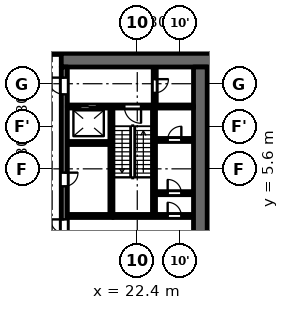
"""IFC4 building model, lengths in metres.
Left out: names, types, materials, properties, quantities, classifications, styles, units other than length and angle.
Written with IfcOpenShell. Run it as: python <this file> out.ifc"""

import sys

from ifc_helpers import new_model, si_unit, direction, frame, frame_2d, origin, origin_2d, place, context, subcontext, project, spatial, polyline, rectangle, outline, extrude, element, fill, save


model = new_model("IFC4")
c1 = context("Model", 3, precision=1e-05, world=origin(), true_north=direction((0.0, 1.0)))
c2 = subcontext(c1, "Body", "Model", "MODEL_VIEW")
j1 = project(units=[si_unit("LENGTHUNIT", "METRE"), si_unit("PLANEANGLEUNIT", "RADIAN")], contexts=[c1])
p1 = place(None, origin())
s1 = spatial("IfcSite", under=j1, at=p1, CompositionType="ELEMENT")
p2 = place(p1, origin())
s2 = spatial("IfcBuilding", under=s1, at=p2, CompositionType="ELEMENT")
p3 = place(p2, frame((0.0, 0.0, -4.5)))
s3 = spatial("IfcBuildingStorey", under=s2, at=p3, CompositionType="ELEMENT", Elevation=-4.5)
p4 = place(p3, frame((0.0, 0.0, -0.5)))
e1 = element("IfcWall", 1, at=p4, inside=s3, PredefinedType="SOLIDWALL", context=c2, shape_type="SweptSolid", body=[
    extrude(outline(polyline([(26.851, 20.0), (26.144, 20.0), (27.038, 19.105), (28.472, 16.996), (28.95, 14.49), (28.95, 10.0), (29.45, 10.0), (29.45, 14.537), (28.944, 17.191), (27.425, 19.426), (26.851, 20.0)])), origin(), (0.0, 0.0, 1.0), 5.0),
])
for number, where, z_axis, x_axis in (
    (2, (28.0, 5.6, 0.0), (0.0, 0.0, 1.0), (1.0, 0.0, 0.0)),
    (3, (28.0, 11.2, 0.0), (0.0, 0.0, 1.0), (1.0, 0.0, 0.0)),
):
    element("IfcColumn", number, at=place(p3, frame(where, z_axis=z_axis, x_axis=x_axis)), inside=s3, PredefinedType="COLUMN", context=c2, shape_type="SweptSolid", body=[
        extrude(rectangle(XDim=1.8, YDim=1.8, at=origin_2d()), origin(), (0.0, 0.0, 1.0), 4.5),
    ])
p5 = place(p3, frame((20.7, 2.6, 0.0), z_axis=(0.0, 0.0, 1.0), x_axis=(0.0, 1.0, 0.0)))
e4 = element("IfcWall", 4, at=p5, inside=s3, PredefinedType="SHEAR", context=c2, shape_type="SweptSolid", body=[
    extrude(rectangle(XDim=7.0, YDim=0.2, at=frame_2d((3.5, 0.0))), origin(), (0.0, 0.0, 1.0), 4.05),
])
p6 = place(p3, frame((20.8, 2.5, 0.0), z_axis=(0.0, 0.0, 1.0), x_axis=(1.0, 0.0, 0.0)))
e5 = element("IfcWall", 5, at=p6, inside=s3, PredefinedType="SHEAR", context=c2, shape_type="SweptSolid", body=[
    extrude(rectangle(XDim=5.3, YDim=0.2, at=frame_2d((2.65, 0.0))), origin(), (0.0, 0.0, 1.0), 4.05),
])
p7 = place(p6, frame((3.6, 0.0, 0.0)))
e6 = element("IfcOpeningElement", 6, at=p7, cuts=e5, PredefinedType="OPENING", context=c2, shape_type="SweptSolid", body=[
    extrude(rectangle(XDim=0.9, YDim=2.1, at=frame_2d((0.45, 1.05))), frame((0.0, 0.11, 0.0), z_axis=(0.0, -1.0, 0.0), x_axis=(1.0, 0.0, 0.0)), (0.0, 0.0, 1.0), 0.22),
])
p8 = place(p3, frame((17.4, 12.75, 0.0), z_axis=(0.0, 0.0, 1.0), x_axis=(1.0, 0.0, 0.0)))
e7 = element("IfcWall", 7, at=p8, inside=s3, PredefinedType="SHEAR", context=c2, shape_type="SweptSolid", body=[
    extrude(rectangle(XDim=10.4, YDim=0.9, at=frame_2d((5.2, 0.0))), origin(), (0.0, 0.0, 1.0), 4.05),
])
p9 = place(p3, frame((17.6, -12.3, 0.0), z_axis=(0.0, 0.0, 1.0), x_axis=(0.0, 1.0, 0.0)))
e8 = element("IfcWall", 8, at=p9, inside=s3, PredefinedType="SHEAR", context=c2, shape_type="SweptSolid", body=[
    extrude(rectangle(XDim=24.6, YDim=0.4, at=frame_2d((12.3, 0.0))), origin(), (0.0, 0.0, 1.0), 4.05),
])
p10 = place(p9, frame((6.0, 0.0, 0.0)))
e9 = element("IfcOpeningElement", 9, at=p10, cuts=e8, PredefinedType="OPENING", context=c2, shape_type="SweptSolid", body=[
    extrude(rectangle(XDim=1.1, YDim=2.1, at=frame_2d((0.55, 1.05))), frame((0.0, 0.21, 0.0), z_axis=(0.0, -1.0, 0.0), x_axis=(1.0, 0.0, 0.0)), (0.0, 0.0, 1.0), 0.42),
])
p11 = place(p9, frame((8.4, 0.0, 0.0)))
e10 = element("IfcOpeningElement", 10, at=p11, cuts=e8, PredefinedType="OPENING", context=c2, shape_type="SweptSolid", body=[
    extrude(rectangle(XDim=1.1, YDim=2.1, at=frame_2d((0.55, 1.05))), frame((0.0, 0.21, 0.0), z_axis=(0.0, -1.0, 0.0), x_axis=(1.0, 0.0, 0.0)), (0.0, 0.0, 1.0), 0.42),
])
p12 = place(p9, frame((10.8, 0.0, 0.0)))
e11 = element("IfcOpeningElement", 11, at=p12, cuts=e8, PredefinedType="OPENING", context=c2, shape_type="SweptSolid", body=[
    extrude(rectangle(XDim=1.1, YDim=2.1, at=frame_2d((0.55, 1.05))), frame((0.0, 0.21, 0.0), z_axis=(0.0, -1.0, 0.0), x_axis=(1.0, 0.0, 0.0)), (0.0, 0.0, 1.0), 0.42),
])
p13 = place(p9, frame((16.75, 0.0, 0.0)))
e12 = element("IfcOpeningElement", 12, at=p13, cuts=e8, PredefinedType="OPENING", context=c2, shape_type="SweptSolid", body=[
    extrude(rectangle(XDim=0.9, YDim=2.1, at=frame_2d((0.45, 1.05))), frame((0.0, 0.21, 0.0), z_axis=(0.0, -1.0, 0.0), x_axis=(1.0, 0.0, 0.0)), (0.0, 0.0, 1.0), 0.42),
])
p14 = place(p9, frame((22.8, 0.0, 0.0)))
e13 = element("IfcOpeningElement", 13, at=p14, cuts=e8, PredefinedType="OPENING", context=c2, shape_type="SweptSolid", body=[
    extrude(rectangle(XDim=1.1, YDim=2.1, at=frame_2d((0.55, 1.05))), frame((0.0, 0.21, 0.0), z_axis=(0.0, -1.0, 0.0), x_axis=(1.0, 0.0, 0.0)), (0.0, 0.0, 1.0), 0.42),
])
p15 = place(p9, frame((0.7, 0.0, 0.0)))
e14 = element("IfcOpeningElement", 14, at=p15, cuts=e8, PredefinedType="OPENING", context=c2, shape_type="SweptSolid", body=[
    extrude(rectangle(XDim=1.1, YDim=2.1, at=frame_2d((0.55, 1.05))), frame((0.0, 0.21, 0.0), z_axis=(0.0, -1.0, 0.0), x_axis=(1.0, 0.0, 0.0)), (0.0, 0.0, 1.0), 0.42),
])
p16 = place(p9, frame((12.775, 0.0, 0.0)))
e15 = element("IfcOpeningElement", 15, at=p16, cuts=e8, PredefinedType="OPENING", context=c2, shape_type="SweptSolid", body=[
    extrude(rectangle(XDim=1.8, YDim=2.1, at=frame_2d((0.9, 1.05))), frame((0.0, 0.21, 0.0), z_axis=(0.0, -1.0, 0.0), x_axis=(1.0, 0.0, 0.0)), (0.0, 0.0, 1.0), 0.42),
])
p17 = place(p3, frame((26.55, -12.3, 0.0), z_axis=(0.0, 0.0, 1.0), x_axis=(0.0, 1.0, 0.0)))
e16 = element("IfcWall", 16, at=p17, inside=s3, PredefinedType="SHEAR", context=c2, shape_type="SweptSolid", body=[
    extrude(rectangle(XDim=24.6, YDim=0.9, at=frame_2d((12.3, 0.0))), origin(), (0.0, 0.0, 1.0), 4.05),
])
p18 = place(p3, frame((23.55, 9.8, 0.0), z_axis=(0.0, 0.0, 1.0), x_axis=(0.0, 1.0, 0.0)))
e17 = element("IfcWall", 17, at=p18, inside=s3, PredefinedType="PARTITIONING", context=c2, shape_type="SweptSolid", body=[
    extrude(rectangle(XDim=2.5, YDim=0.2, at=frame_2d((1.25, 0.0))), origin(), (0.0, 0.0, 1.0), 4.05),
])
p19 = place(p18, frame((0.8, 0.0, 0.0)))
e18 = element("IfcOpeningElement", 18, at=p19, cuts=e17, PredefinedType="OPENING", context=c2, shape_type="SweptSolid", body=[
    extrude(rectangle(XDim=0.9, YDim=2.1, at=frame_2d((0.45, 1.05))), frame((0.0, 0.11, 0.0), z_axis=(0.0, -1.0, 0.0), x_axis=(1.0, 0.0, 0.0)), (0.0, 0.0, 1.0), 0.22),
])
p20 = place(p3, frame((23.6, 4.0, 0.0), z_axis=(0.0, 0.0, 1.0), x_axis=(1.0, 0.0, 0.0)))
e19 = element("IfcWall", 19, at=p20, inside=s3, PredefinedType="PARTITIONING", context=c2, shape_type="SweptSolid", body=[
    extrude(rectangle(XDim=2.5, YDim=0.2, at=frame_2d((1.25, 0.0))), origin(), (0.0, 0.0, 1.0), 4.05),
])
p21 = place(p20, frame((0.8, 0.0, 0.0)))
e20 = element("IfcOpeningElement", 20, at=p21, cuts=e19, PredefinedType="OPENING", context=c2, shape_type="SweptSolid", body=[
    extrude(rectangle(XDim=0.9, YDim=2.1, at=frame_2d((0.45, 1.05))), frame((0.0, 0.11, 0.0), z_axis=(0.0, -1.0, 0.0), x_axis=(1.0, 0.0, 0.0)), (0.0, 0.0, 1.0), 0.22),
])
p22 = place(p3, frame((23.6, 7.5, 0.0), z_axis=(0.0, 0.0, 1.0), x_axis=(1.0, 0.0, 0.0)))
e21 = element("IfcWall", 21, at=p22, inside=s3, PredefinedType="PARTITIONING", context=c2, shape_type="SweptSolid", body=[
    extrude(rectangle(XDim=2.5, YDim=0.2, at=frame_2d((1.25, 0.0))), origin(), (0.0, 0.0, 1.0), 4.05),
])
p23 = place(p22, frame((0.8, 0.0, 0.0)))
e22 = element("IfcOpeningElement", 22, at=p23, cuts=e21, PredefinedType="OPENING", context=c2, shape_type="SweptSolid", body=[
    extrude(rectangle(XDim=0.9, YDim=2.1, at=frame_2d((0.45, 1.05))), frame((0.0, 0.11, 0.0), z_axis=(0.0, -1.0, 0.0), x_axis=(1.0, 0.0, 0.0)), (0.0, 0.0, 1.0), 0.22),
])
p24 = place(p3, frame((17.8, 2.5, 0.0), z_axis=(0.0, 0.0, 1.0), x_axis=(1.0, 0.0, 0.0)))
e23 = element("IfcWall", 23, at=p24, inside=s3, PredefinedType="PARTITIONING", context=c2, shape_type="SweptSolid", body=[
    extrude(rectangle(XDim=3.0, YDim=0.2, at=frame_2d((1.5, 0.0))), origin(), (0.0, 0.0, 1.0), 4.05),
])
p25 = place(p3, frame((17.8, 7.3, 0.0), z_axis=(0.0, 0.0, 1.0), x_axis=(1.0, 0.0, 0.0)))
e24 = element("IfcWall", 24, at=p25, inside=s3, PredefinedType="PARTITIONING", context=c2, shape_type="SweptSolid", body=[
    extrude(rectangle(XDim=2.8, YDim=0.2, at=frame_2d((1.4, 0.0))), origin(), (0.0, 0.0, 1.0), 4.05),
])
p26 = place(p3, frame((17.8, 9.7, 0.0), z_axis=(0.0, 0.0, 1.0), x_axis=(1.0, 0.0, 0.0)))
e25 = element("IfcWall", 25, at=p26, inside=s3, PredefinedType="SHEAR", context=c2, shape_type="SweptSolid", body=[
    extrude(rectangle(XDim=8.3, YDim=0.2, at=frame_2d((4.15, 0.0))), origin(), (0.0, 0.0, 1.0), 4.05),
])
p27 = place(p26, frame((0.85, 0.0, 0.0)))
e26 = element("IfcOpeningElement", 26, at=p27, cuts=e25, PredefinedType="OPENING", context=c2, shape_type="SweptSolid", body=[
    extrude(rectangle(XDim=1.1, YDim=2.1, at=frame_2d((0.55, 1.05))), frame((0.0, 0.11, 0.0), z_axis=(0.0, -1.0, 0.0), x_axis=(1.0, 0.0, 0.0)), (0.0, 0.0, 1.0), 0.22),
])
p28 = place(p26, frame((3.75, 0.0, 0.0)))
e27 = element("IfcOpeningElement", 27, at=p28, cuts=e25, PredefinedType="OPENING", context=c2, shape_type="SweptSolid", body=[
    extrude(rectangle(XDim=1.1, YDim=2.1, at=frame_2d((0.55, 1.05))), frame((0.0, 0.11, 0.0), z_axis=(0.0, -1.0, 0.0), x_axis=(1.0, 0.0, 0.0)), (0.0, 0.0, 1.0), 0.22),
])
p29 = place(p3, frame((23.5, 2.6, 0.0), z_axis=(0.0, 0.0, 1.0), x_axis=(0.0, 1.0, 0.0)))
e28 = element("IfcWall", 28, at=p29, inside=s3, PredefinedType="SHEAR", context=c2, shape_type="SweptSolid", body=[
    extrude(rectangle(XDim=7.0, YDim=0.2, at=frame_2d((3.5, 0.0))), origin(), (0.0, 0.0, 1.0), 4.05),
])
p30 = place(p3, frame((-17.4, 13.2, 0.0), z_axis=(0.0, 0.0, 1.0), x_axis=(1.0, 0.0, 0.0)))
e29 = element("IfcWall", 29, at=p30, inside=s3, PredefinedType="PARTITIONING", context=c2, shape_type="SweptSolid", body=[
    extrude(rectangle(XDim=34.8, YDim=0.15, at=frame_2d((17.4, 0.0))), origin(), (0.0, 0.0, 1.0), 4.05),
])
p31 = place(p30, frame((17.55, 0.0, 0.0)))
e30 = element("IfcOpeningElement", 30, at=p31, cuts=e29, PredefinedType="OPENING", context=c2, shape_type="SweptSolid", body=[
    extrude(rectangle(XDim=1.2, YDim=2.1, at=frame_2d((0.6, 1.05))), frame((0.0, 0.085, 0.0), z_axis=(0.0, -1.0, 0.0), x_axis=(1.0, 0.0, 0.0)), (0.0, 0.0, 1.0), 0.17),
])
p32 = place(p30, frame((0.75, 0.0, 0.0)))
e31 = element("IfcOpeningElement", 31, at=p32, cuts=e29, PredefinedType="OPENING", context=c2, shape_type="SweptSolid", body=[
    extrude(rectangle(XDim=1.0, YDim=2.1, at=frame_2d((0.5, 1.05))), frame((0.0, 0.085, 0.0), z_axis=(0.0, -1.0, 0.0), x_axis=(1.0, 0.0, 0.0)), (0.0, 0.0, 1.0), 0.17),
])
p33 = place(p30, frame((33.15, 0.0, 0.0)))
e32 = element("IfcOpeningElement", 32, at=p33, cuts=e29, PredefinedType="OPENING", context=c2, shape_type="SweptSolid", body=[
    extrude(rectangle(XDim=1.0, YDim=2.1, at=frame_2d((0.5, 1.05))), frame((0.0, 0.085, 0.0), z_axis=(0.0, -1.0, 0.0), x_axis=(1.0, 0.0, 0.0)), (0.0, 0.0, 1.0), 0.17),
])
p34 = place(p13, origin())
e33 = element("IfcDoor", 33, at=p34, inside=s3, OperationType="SINGLE_SWING_RIGHT", PredefinedType="DOOR", context=c2, shape_type="SweptSolid", body=[
    extrude(rectangle(XDim=0.9, YDim=2.1, at=frame_2d((0.45, 1.05))), frame((0.0, 0.025, 0.0), z_axis=(0.0, -1.0, 0.0), x_axis=(1.0, 0.0, 0.0)), (0.0, 0.0, 1.0), 0.05),
])
fill(e12, e33)
p35 = place(p27, origin())
e34 = element("IfcDoor", 34, at=p35, inside=s3, OperationType="DOUBLE_DOOR_SLIDING", PredefinedType="DOOR", context=c2, shape_type="SweptSolid", body=[
    extrude(rectangle(XDim=1.1, YDim=2.1, at=frame_2d((0.55, 1.05))), frame((0.0, 0.025, 0.0), z_axis=(0.0, -1.0, 0.0), x_axis=(1.0, 0.0, 0.0)), (0.0, 0.0, 1.0), 0.05),
])
fill(e26, e34)
p36 = place(p14, origin())
e35 = element("IfcDoor", 35, at=p36, inside=s3, OperationType="SINGLE_SWING_LEFT", PredefinedType="DOOR", context=c2, shape_type="SweptSolid", body=[
    extrude(rectangle(XDim=1.1, YDim=2.1, at=frame_2d((0.55, 1.05))), frame((0.0, 0.025, 0.0), z_axis=(0.0, -1.0, 0.0), x_axis=(1.0, 0.0, 0.0)), (0.0, 0.0, 1.0), 0.05),
])
fill(e13, e35)
p37 = place(p19, origin())
e36 = element("IfcDoor", 36, at=p37, inside=s3, OperationType="SINGLE_SWING_RIGHT", PredefinedType="DOOR", context=c2, shape_type="SweptSolid", body=[
    extrude(rectangle(XDim=0.9, YDim=2.1, at=frame_2d((0.45, 1.05))), frame((0.0, 0.025, 0.0), z_axis=(0.0, -1.0, 0.0), x_axis=(1.0, 0.0, 0.0)), (0.0, 0.0, 1.0), 0.05),
])
fill(e18, e36)
p38 = place(p28, origin())
e37 = element("IfcDoor", 37, at=p38, inside=s3, OperationType="SINGLE_SWING_RIGHT", PredefinedType="DOOR", context=c2, shape_type="SweptSolid", body=[
    extrude(rectangle(XDim=1.1, YDim=2.1, at=frame_2d((0.55, 1.05))), frame((0.0, 0.025, 0.0), z_axis=(0.0, -1.0, 0.0), x_axis=(1.0, 0.0, 0.0)), (0.0, 0.0, 1.0), 0.05),
])
fill(e27, e37)
p39 = place(p16, origin())
e38 = element("IfcDoor", 38, at=p39, inside=s3, OperationType="DOUBLE_DOOR_SINGLE_SWING", PredefinedType="DOOR", context=c2, shape_type="SweptSolid", body=[
    extrude(rectangle(XDim=1.8, YDim=2.1, at=frame_2d((0.9, 1.05))), frame((0.0, 0.025, 0.0), z_axis=(0.0, -1.0, 0.0), x_axis=(1.0, 0.0, 0.0)), (0.0, 0.0, 1.0), 0.05),
])
fill(e15, e38)
p40 = place(p21, origin())
e39 = element("IfcDoor", 39, at=p40, inside=s3, OperationType="SINGLE_SWING_RIGHT", PredefinedType="DOOR", context=c2, shape_type="SweptSolid", body=[
    extrude(rectangle(XDim=0.9, YDim=2.1, at=frame_2d((0.45, 1.05))), frame((0.0, 0.025, 0.0), z_axis=(0.0, -1.0, 0.0), x_axis=(1.0, 0.0, 0.0)), (0.0, 0.0, 1.0), 0.05),
])
fill(e20, e39)
p41 = place(p23, origin())
e40 = element("IfcDoor", 40, at=p41, inside=s3, OperationType="SINGLE_SWING_LEFT", PredefinedType="DOOR", context=c2, shape_type="SweptSolid", body=[
    extrude(rectangle(XDim=0.9, YDim=2.1, at=frame_2d((0.45, 1.05))), frame((0.0, 0.025, 0.0), z_axis=(0.0, -1.0, 0.0), x_axis=(1.0, 0.0, 0.0)), (0.0, 0.0, 1.0), 0.05),
])
fill(e22, e40)
p42 = place(p7, origin())
e41 = element("IfcDoor", 41, at=p42, inside=s3, OperationType="SINGLE_SWING_RIGHT", PredefinedType="DOOR", context=c2, shape_type="SweptSolid", body=[
    extrude(rectangle(XDim=0.9, YDim=2.1, at=frame_2d((0.45, 1.05))), frame((0.0, 0.025, 0.0), z_axis=(0.0, -1.0, 0.0), x_axis=(1.0, 0.0, 0.0)), (0.0, 0.0, 1.0), 0.05),
])
fill(e6, e41)
save(model, sys.argv[1])
